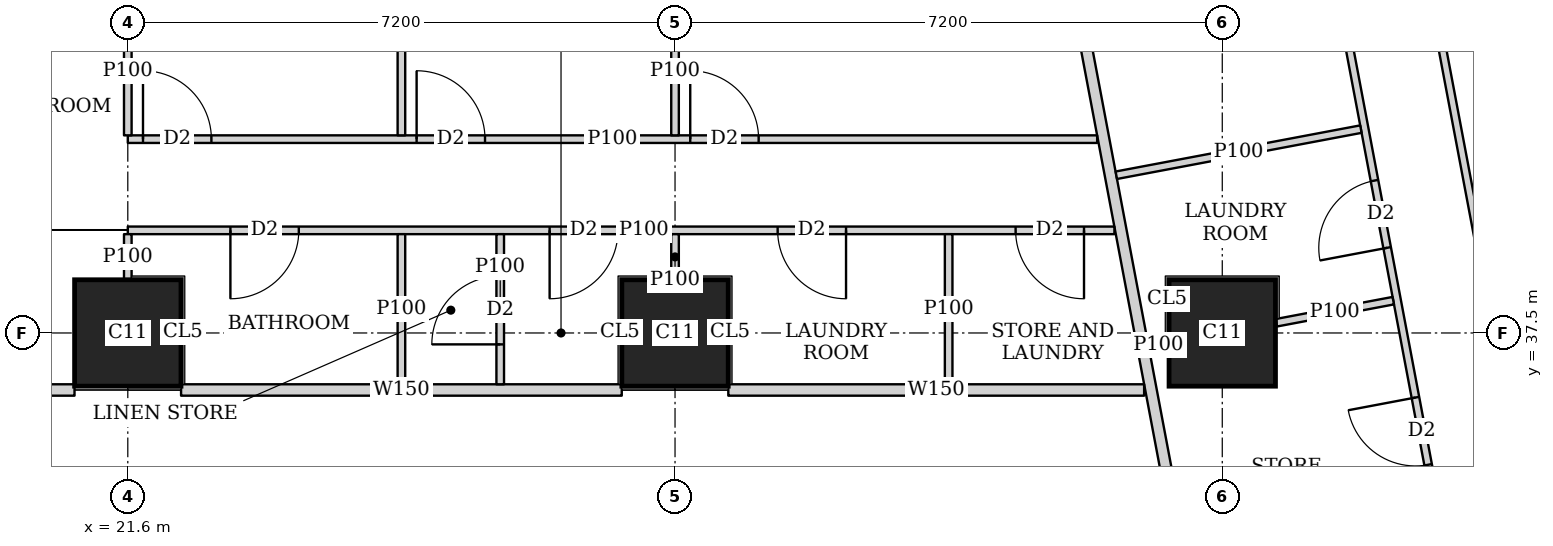
"""IFC4 building model, lengths in metres.
Left out: names, types, materials, properties, quantities, classifications, styles, units other than length and angle.
Written with IfcOpenShell. Run it as: python <this file> out.ifc"""

import sys

from ifc_helpers import new_model, si_unit, direction, frame, frame_2d, origin, origin_2d, place, context, subcontext, project, spatial, rectangle, extrude, element, fill, save


model = new_model("IFC4")
c1 = context("Model", 3, precision=1e-05, world=origin(), true_north=direction((0.0, 1.0)))
c2 = subcontext(c1, "Body", "Model", "MODEL_VIEW")
j1 = project(units=[si_unit("LENGTHUNIT", "METRE"), si_unit("PLANEANGLEUNIT", "RADIAN")], contexts=[c1])
p1 = place(None, origin())
s1 = spatial("IfcSite", under=j1, at=p1, CompositionType="ELEMENT")
p2 = place(p1, origin())
s2 = spatial("IfcBuilding", under=s1, at=p2, CompositionType="ELEMENT")
p3 = place(p2, frame((0.0, 0.0, 270.35)))
s3 = spatial("IfcBuildingStorey", under=s2, at=p3, CompositionType="ELEMENT", Elevation=270.35)
for number, where, z_axis, x_axis in (
    (1, (21.6, 37.5, 0.0), (0.0, 0.0, 1.0), (1.0, 0.0, 0.0)),
    (2, (28.8, 37.5, 0.0), (0.0, 0.0, 1.0), (1.0, 0.0, 0.0)),
    (3, (36.0, 37.5, 0.0), (0.0, 0.0, 1.0), (1.0, 0.0, 0.0)),
):
    element("IfcColumn", number, at=place(p3, frame(where, z_axis=z_axis, x_axis=x_axis)), inside=s3, PredefinedType="COLUMN", context=c2, shape_type="SweptSolid", body=[
        extrude(rectangle(XDim=1.4, YDim=1.4, at=origin_2d()), origin(), (0.0, 0.0, 1.0), 3.75),
    ])
p4 = place(p3, frame((16.001, 36.75, 0.0), z_axis=(0.0, 0.0, 1.0), x_axis=(1.0, 0.0, 0.0)))
e4 = element("IfcWall", 4, at=p4, inside=s3, PredefinedType="SOLIDWALL", context=c2, shape_type="SweptSolid", body=[
    extrude(rectangle(XDim=4.898, YDim=0.15, at=frame_2d((2.449, 0.0))), origin(), (0.0, 0.0, 1.0), 3.5),
])
p5 = place(p4, frame((1.074, 0.0, 0.0)))
e5 = element("IfcOpeningElement", 5, at=p5, cuts=e4, PredefinedType="OPENING", context=c2, shape_type="SweptSolid", body=[
    extrude(rectangle(XDim=1.0, YDim=2.1, at=frame_2d((0.5, 1.05))), frame((0.0, 0.085, 0.0), z_axis=(0.0, -1.0, 0.0), x_axis=(1.0, 0.0, 0.0)), (0.0, 0.0, 1.0), 0.17),
])
p6 = place(p3, frame((22.301, 36.75, 0.0), z_axis=(0.0, 0.0, 1.0), x_axis=(1.0, 0.0, 0.0)))
e6 = element("IfcWall", 6, at=p6, inside=s3, PredefinedType="SOLIDWALL", context=c2, shape_type="SweptSolid", body=[
    extrude(rectangle(XDim=5.798, YDim=0.15, at=frame_2d((2.899, 0.0))), origin(), (0.0, 0.0, 1.0), 3.5),
])
p7 = place(p3, frame((29.501, 36.75, 0.0), z_axis=(0.0, 0.0, 1.0), x_axis=(1.0, 0.0, 0.0)))
e7 = element("IfcWall", 7, at=p7, inside=s3, PredefinedType="SOLIDWALL", context=c2, shape_type="SweptSolid", body=[
    extrude(rectangle(XDim=5.471, YDim=0.15, at=frame_2d((2.735, 0.0))), origin(), (0.0, 0.0, 1.0), 3.5),
])
p8 = place(p3, frame((34.036, 42.186, 0.0), z_axis=(0.0, 0.0, 1.0), x_axis=(0.185593518645, -0.9826266055, 0.0)))
e8 = element("IfcWall", 8, at=p8, inside=s3, PredefinedType="SOLIDWALL", context=c2, shape_type="SweptSolid", body=[
    extrude(rectangle(XDim=35.961, YDim=0.15, at=frame_2d((17.98, 0.0))), origin(), (0.0, 0.0, 1.0), 2.5),
])
p9 = place(p8, frame((15.529, 0.0, 0.0)))
e9 = element("IfcOpeningElement", 9, at=p9, cuts=e8, PredefinedType="OPENING", context=c2, shape_type="SweptSolid", body=[
    extrude(rectangle(XDim=1.0, YDim=2.1, at=frame_2d((0.5, 1.05))), frame((0.0, 0.085, 0.0), z_axis=(0.0, -1.0, 0.0), x_axis=(1.0, 0.0, 0.0)), (0.0, 0.0, 1.0), 0.17),
])
p10 = place(p8, frame((19.345, 0.0, 0.0)))
e10 = element("IfcOpeningElement", 10, at=p10, cuts=e8, PredefinedType="OPENING", context=c2, shape_type="SweptSolid", body=[
    extrude(rectangle(XDim=1.0, YDim=2.1, at=frame_2d((0.5, 1.05))), frame((0.0, 0.085, 0.0), z_axis=(0.0, -1.0, 0.0), x_axis=(1.0, 0.0, 0.0)), (0.0, 0.0, 1.0), 0.17),
])
p11 = place(p8, frame((30.594, 0.0, 0.0)))
e11 = element("IfcOpeningElement", 11, at=p11, cuts=e8, PredefinedType="OPENING", context=c2, shape_type="SweptSolid", body=[
    extrude(rectangle(XDim=1.0, YDim=2.1, at=frame_2d((0.5, 1.05))), frame((0.0, 0.085, 0.0), z_axis=(0.0, -1.0, 0.0), x_axis=(1.0, 0.0, 0.0)), (0.0, 0.0, 1.0), 0.17),
])
p12 = place(p3, frame((38.744, 42.045, 0.0), z_axis=(0.0, 0.0, 1.0), x_axis=(0.185614085367, -0.982622720739, 0.0)))
e12 = element("IfcWall", 12, at=p12, inside=s3, PredefinedType="PARTITIONING", context=c2, shape_type="SweptSolid", body=[
    extrude(rectangle(XDim=12.898, YDim=0.1, at=frame_2d((6.449, 0.0))), origin(), (0.0, 0.0, 1.0), 2.5),
])
p13 = place(p12, frame((11.848, 0.0, 0.0)))
e13 = element("IfcOpeningElement", 13, at=p13, cuts=e12, PredefinedType="OPENING", context=c2, shape_type="SweptSolid", body=[
    extrude(rectangle(XDim=0.9, YDim=2.1, at=frame_2d((0.45, 1.05))), frame((0.0, 0.06, 0.0), z_axis=(0.0, -1.0, 0.0), x_axis=(1.0, 0.0, 0.0)), (0.0, 0.0, 1.0), 0.12),
])
p14 = place(p12, frame((8.191, 0.0, 0.0)))
e14 = element("IfcOpeningElement", 14, at=p14, cuts=e12, PredefinedType="OPENING", context=c2, shape_type="SweptSolid", body=[
    extrude(rectangle(XDim=0.9, YDim=2.1, at=frame_2d((0.45, 1.05))), frame((0.0, 0.06, 0.0), z_axis=(0.0, -1.0, 0.0), x_axis=(1.0, 0.0, 0.0)), (0.0, 0.0, 1.0), 0.12),
])
p15 = place(p12, frame((4.215, 0.0, 0.0)))
e15 = element("IfcOpeningElement", 15, at=p15, cuts=e12, PredefinedType="OPENING", context=c2, shape_type="SweptSolid", body=[
    extrude(rectangle(XDim=0.9, YDim=2.1, at=frame_2d((0.45, 1.05))), frame((0.0, 0.06, 0.0), z_axis=(0.0, -1.0, 0.0), x_axis=(1.0, 0.0, 0.0)), (0.0, 0.0, 1.0), 0.12),
])
p16 = place(p3, frame((37.511, 42.109, 0.0), z_axis=(0.0, 0.0, 1.0), x_axis=(0.185550464988, -0.982634736279, 0.0)))
e16 = element("IfcWall", 16, at=p16, inside=s3, PredefinedType="PARTITIONING", context=c2, shape_type="SweptSolid", body=[
    extrude(rectangle(XDim=13.35, YDim=0.1, at=frame_2d((6.675, 0.0))), origin(), (0.0, 0.0, 1.0), 2.5),
])
p17 = place(p16, frame((11.845, 0.0, 0.0)))
e17 = element("IfcOpeningElement", 17, at=p17, cuts=e16, PredefinedType="OPENING", context=c2, shape_type="SweptSolid", body=[
    extrude(rectangle(XDim=0.9, YDim=2.1, at=frame_2d((0.45, 1.05))), frame((0.0, 0.06, 0.0), z_axis=(0.0, -1.0, 0.0), x_axis=(1.0, 0.0, 0.0)), (0.0, 0.0, 1.0), 0.12),
])
p18 = place(p16, frame((8.224, 0.0, 0.0)))
e18 = element("IfcOpeningElement", 18, at=p18, cuts=e16, PredefinedType="OPENING", context=c2, shape_type="SweptSolid", body=[
    extrude(rectangle(XDim=0.9, YDim=2.1, at=frame_2d((0.45, 1.05))), frame((0.0, 0.06, 0.0), z_axis=(0.0, -1.0, 0.0), x_axis=(1.0, 0.0, 0.0)), (0.0, 0.0, 1.0), 0.12),
])
p19 = place(p16, frame((2.65, 0.0, 0.0)))
e19 = element("IfcOpeningElement", 19, at=p19, cuts=e16, PredefinedType="OPENING", context=c2, shape_type="SweptSolid", body=[
    extrude(rectangle(XDim=0.9, YDim=2.1, at=frame_2d((0.45, 1.05))), frame((0.0, 0.06, 0.0), z_axis=(0.0, -1.0, 0.0), x_axis=(1.0, 0.0, 0.0)), (0.0, 0.0, 1.0), 0.12),
])
p20 = place(p16, frame((9.936, 0.0, 0.0)))
e20 = element("IfcOpeningElement", 20, at=p20, cuts=e16, PredefinedType="OPENING", context=c2, shape_type="SweptSolid", body=[
    extrude(rectangle(XDim=0.9, YDim=2.1, at=frame_2d((0.45, 1.05))), frame((0.0, 0.06, 0.0), z_axis=(0.0, -1.0, 0.0), x_axis=(1.0, 0.0, 0.0)), (0.0, 0.0, 1.0), 0.12),
])
p21 = place(p16, frame((5.555, 0.0, 0.0)))
e21 = element("IfcOpeningElement", 21, at=p21, cuts=e16, PredefinedType="OPENING", context=c2, shape_type="SweptSolid", body=[
    extrude(rectangle(XDim=0.9, YDim=2.1, at=frame_2d((0.45, 1.05))), frame((0.0, 0.06, 0.0), z_axis=(0.0, -1.0, 0.0), x_axis=(1.0, 0.0, 0.0)), (0.0, 0.0, 1.0), 0.12),
])
p22 = place(p3, frame((37.824, 40.182, 0.0), z_axis=(0.0, 0.0, 1.0), x_axis=(-0.982674977865, -0.185337227447, 0.0)))
e22 = element("IfcWall", 22, at=p22, inside=s3, PredefinedType="PARTITIONING", context=c2, shape_type="SweptSolid", body=[
    extrude(rectangle(XDim=3.275, YDim=0.1, at=frame_2d((1.637, 0.0))), origin(), (0.0, 0.0, 1.0), 3.5),
])
p23 = place(p3, frame((38.25, 37.925, 0.0), z_axis=(0.0, 0.0, 1.0), x_axis=(-0.982610209589, -0.185680305934, 0.0)))
e23 = element("IfcWall", 23, at=p23, inside=s3, PredefinedType="PARTITIONING", context=c2, shape_type="SweptSolid", body=[
    extrude(rectangle(XDim=1.567, YDim=0.1, at=frame_2d((0.784, 0.0))), origin(), (0.0, 0.0, 1.0), 3.5),
])
p24 = place(p3, frame((35.29, 37.366, 0.0), z_axis=(0.0, 0.0, 1.0), x_axis=(-0.982395465615, -0.18681313963, 0.0)))
e24 = element("IfcWall", 24, at=p24, inside=s3, PredefinedType="PARTITIONING", context=c2, shape_type="SweptSolid", body=[
    extrude(rectangle(XDim=0.263, YDim=0.1, at=frame_2d((0.131, 0.0))), origin(), (0.0, 0.0, 1.0), 3.5),
])
p25 = place(p3, frame((21.6, 40.05, 0.0), z_axis=(0.0, 0.0, 1.0), x_axis=(1.0, 0.0, 0.0)))
e25 = element("IfcWall", 25, at=p25, inside=s3, PredefinedType="PARTITIONING", context=c2, shape_type="SweptSolid", body=[
    extrude(rectangle(XDim=12.754, YDim=0.1, at=frame_2d((6.377, 0.0))), origin(), (0.0, 0.0, 1.0), 3.5),
])
p26 = place(p25, frame((0.2, 0.0, 0.0)))
e26 = element("IfcOpeningElement", 26, at=p26, cuts=e25, PredefinedType="OPENING", context=c2, shape_type="SweptSolid", body=[
    extrude(rectangle(XDim=0.9, YDim=2.1, at=frame_2d((0.45, 1.05))), frame((0.0, 0.06, 0.0), z_axis=(0.0, -1.0, 0.0), x_axis=(1.0, 0.0, 0.0)), (0.0, 0.0, 1.0), 0.12),
])
p27 = place(p25, frame((3.8, 0.0, 0.0)))
e27 = element("IfcOpeningElement", 27, at=p27, cuts=e25, PredefinedType="OPENING", context=c2, shape_type="SweptSolid", body=[
    extrude(rectangle(XDim=0.9, YDim=2.1, at=frame_2d((0.45, 1.05))), frame((0.0, 0.06, 0.0), z_axis=(0.0, -1.0, 0.0), x_axis=(1.0, 0.0, 0.0)), (0.0, 0.0, 1.0), 0.12),
])
p28 = place(p25, frame((7.4, 0.0, 0.0)))
e28 = element("IfcOpeningElement", 28, at=p28, cuts=e25, PredefinedType="OPENING", context=c2, shape_type="SweptSolid", body=[
    extrude(rectangle(XDim=0.9, YDim=2.1, at=frame_2d((0.45, 1.05))), frame((0.0, 0.06, 0.0), z_axis=(0.0, -1.0, 0.0), x_axis=(1.0, 0.0, 0.0)), (0.0, 0.0, 1.0), 0.12),
])
p29 = place(p3, frame((21.6, 38.85, 0.0), z_axis=(0.0, 0.0, 1.0), x_axis=(1.0, 0.0, 0.0)))
e29 = element("IfcWall", 29, at=p29, inside=s3, PredefinedType="PARTITIONING", context=c2, shape_type="SweptSolid", body=[
    extrude(rectangle(XDim=12.981, YDim=0.1, at=frame_2d((6.49, 0.0))), origin(), (0.0, 0.0, 1.0), 3.5),
])
p30 = place(p29, frame((1.35, 0.0, 0.0)))
e30 = element("IfcOpeningElement", 30, at=p30, cuts=e29, PredefinedType="OPENING", context=c2, shape_type="SweptSolid", body=[
    extrude(rectangle(XDim=0.9, YDim=2.1, at=frame_2d((0.45, 1.05))), frame((0.0, 0.06, 0.0), z_axis=(0.0, -1.0, 0.0), x_axis=(1.0, 0.0, 0.0)), (0.0, 0.0, 1.0), 0.12),
])
p31 = place(p29, frame((5.55, 0.0, 0.0)))
e31 = element("IfcOpeningElement", 31, at=p31, cuts=e29, PredefinedType="OPENING", context=c2, shape_type="SweptSolid", body=[
    extrude(rectangle(XDim=0.9, YDim=2.1, at=frame_2d((0.45, 1.05))), frame((0.0, 0.06, 0.0), z_axis=(0.0, -1.0, 0.0), x_axis=(1.0, 0.0, 0.0)), (0.0, 0.0, 1.0), 0.12),
])
p32 = place(p29, frame((8.55, 0.0, 0.0)))
e32 = element("IfcOpeningElement", 32, at=p32, cuts=e29, PredefinedType="OPENING", context=c2, shape_type="SweptSolid", body=[
    extrude(rectangle(XDim=0.9, YDim=2.1, at=frame_2d((0.45, 1.05))), frame((0.0, 0.06, 0.0), z_axis=(0.0, -1.0, 0.0), x_axis=(1.0, 0.0, 0.0)), (0.0, 0.0, 1.0), 0.12),
])
p33 = place(p29, frame((11.681, 0.0, 0.0)))
e33 = element("IfcOpeningElement", 33, at=p33, cuts=e29, PredefinedType="OPENING", context=c2, shape_type="SweptSolid", body=[
    extrude(rectangle(XDim=0.9, YDim=2.1, at=frame_2d((0.45, 1.05))), frame((0.0, 0.06, 0.0), z_axis=(0.0, -1.0, 0.0), x_axis=(1.0, 0.0, 0.0)), (0.0, 0.0, 1.0), 0.12),
])
p34 = place(p3, frame((21.6, 40.1, 0.0), z_axis=(0.0, 0.0, 1.0), x_axis=(0.0, 1.0, 0.0)))
e34 = element("IfcWall", 34, at=p34, inside=s3, PredefinedType="PARTITIONING", context=c2, shape_type="SweptSolid", body=[
    extrude(rectangle(XDim=1.699, YDim=0.1, at=frame_2d((0.85, 0.0))), origin(), (0.0, 0.0, 1.0), 3.5),
])
p35 = place(p3, frame((25.2, 40.1, 0.0), z_axis=(0.0, 0.0, 1.0), x_axis=(0.0, 1.0, 0.0)))
e35 = element("IfcWall", 35, at=p35, inside=s3, PredefinedType="PARTITIONING", context=c2, shape_type="SweptSolid", body=[
    extrude(rectangle(XDim=3.75, YDim=0.1, at=frame_2d((1.875, 0.0))), origin(), (0.0, 0.0, 1.0), 2.05),
])
p36 = place(p3, frame((28.8, 40.1, 0.0), z_axis=(0.0, 0.0, 1.0), x_axis=(0.0, 1.0, 0.0)))
e36 = element("IfcWall", 36, at=p36, inside=s3, PredefinedType="PARTITIONING", context=c2, shape_type="SweptSolid", body=[
    extrude(rectangle(XDim=1.699, YDim=0.1, at=frame_2d((0.85, 0.0))), origin(), (0.0, 0.0, 1.0), 3.5),
])
p37 = place(p3, frame((21.6, 38.201, 0.0), z_axis=(0.0, 0.0, 1.0), x_axis=(0.0, 1.0, 0.0)))
e37 = element("IfcWall", 37, at=p37, inside=s3, PredefinedType="PARTITIONING", context=c2, shape_type="SweptSolid", body=[
    extrude(rectangle(XDim=0.599, YDim=0.1, at=frame_2d((0.3, 0.0))), origin(), (0.0, 0.0, 1.0), 3.5),
])
p38 = place(p3, frame((25.2, 36.825, 0.0), z_axis=(0.0, 0.0, 1.0), x_axis=(0.0, 1.0, 0.0)))
e38 = element("IfcWall", 38, at=p38, inside=s3, PredefinedType="PARTITIONING", context=c2, shape_type="SweptSolid", body=[
    extrude(rectangle(XDim=1.975, YDim=0.1, at=frame_2d((0.988, 0.0))), origin(), (0.0, 0.0, 1.0), 3.5),
])
p39 = place(p3, frame((28.8, 38.201, 0.0), z_axis=(0.0, 0.0, 1.0), x_axis=(0.0, 1.0, 0.0)))
e39 = element("IfcWall", 39, at=p39, inside=s3, PredefinedType="PARTITIONING", context=c2, shape_type="SweptSolid", body=[
    extrude(rectangle(XDim=0.599, YDim=0.1, at=frame_2d((0.3, 0.0))), origin(), (0.0, 0.0, 1.0), 3.5),
])
p40 = place(p3, frame((32.4, 36.825, 0.0), z_axis=(0.0, 0.0, 1.0), x_axis=(0.0, 1.0, 0.0)))
e40 = element("IfcWall", 40, at=p40, inside=s3, PredefinedType="PARTITIONING", context=c2, shape_type="SweptSolid", body=[
    extrude(rectangle(XDim=1.975, YDim=0.1, at=frame_2d((0.988, 0.0))), origin(), (0.0, 0.0, 1.0), 3.5),
])
p41 = place(p3, frame((26.5, 36.825, 0.0), z_axis=(0.0, 0.0, 1.0), x_axis=(0.0, 1.0, 0.0)))
e41 = element("IfcWall", 41, at=p41, inside=s3, PredefinedType="PARTITIONING", context=c2, shape_type="SweptSolid", body=[
    extrude(rectangle(XDim=1.975, YDim=0.1, at=frame_2d((0.988, 0.0))), origin(), (0.0, 0.0, 1.0), 3.5),
])
p42 = place(p41, frame((0.525, 0.0, 0.0)))
e42 = element("IfcOpeningElement", 42, at=p42, cuts=e41, PredefinedType="OPENING", context=c2, shape_type="SweptSolid", body=[
    extrude(rectangle(XDim=0.9, YDim=2.1, at=frame_2d((0.45, 1.05))), frame((0.0, 0.06, 0.0), z_axis=(0.0, -1.0, 0.0), x_axis=(1.0, 0.0, 0.0)), (0.0, 0.0, 1.0), 0.12),
])
p43 = place(p19, origin())
e43 = element("IfcDoor", 43, at=p43, inside=s3, OperationType="SINGLE_SWING_LEFT", PredefinedType="DOOR", context=c2, shape_type="SweptSolid", body=[
    extrude(rectangle(XDim=0.9, YDim=2.1, at=frame_2d((0.45, 1.05))), frame((0.0, 0.025, 0.0), z_axis=(0.0, -1.0, 0.0), x_axis=(1.0, 0.0, 0.0)), (0.0, 0.0, 1.0), 0.05),
])
fill(e19, e43)
p44 = place(p21, origin())
e44 = element("IfcDoor", 44, at=p44, inside=s3, OperationType="SINGLE_SWING_RIGHT", PredefinedType="DOOR", context=c2, shape_type="SweptSolid", body=[
    extrude(rectangle(XDim=0.9, YDim=2.1, at=frame_2d((0.45, 1.05))), frame((0.0, 0.025, 0.0), z_axis=(0.0, -1.0, 0.0), x_axis=(1.0, 0.0, 0.0)), (0.0, 0.0, 1.0), 0.05),
])
fill(e21, e44)
p45 = place(p26, origin())
e45 = element("IfcDoor", 45, at=p45, inside=s3, OperationType="SINGLE_SWING_LEFT", PredefinedType="DOOR", context=c2, shape_type="SweptSolid", body=[
    extrude(rectangle(XDim=0.9, YDim=2.1, at=frame_2d((0.45, 1.05))), frame((0.0, 0.025, 0.0), z_axis=(0.0, -1.0, 0.0), x_axis=(1.0, 0.0, 0.0)), (0.0, 0.0, 1.0), 0.05),
])
fill(e26, e45)
p46 = place(p27, origin())
e46 = element("IfcDoor", 46, at=p46, inside=s3, OperationType="SINGLE_SWING_LEFT", PredefinedType="DOOR", context=c2, shape_type="SweptSolid", body=[
    extrude(rectangle(XDim=0.9, YDim=2.1, at=frame_2d((0.45, 1.05))), frame((0.0, 0.025, 0.0), z_axis=(0.0, -1.0, 0.0), x_axis=(1.0, 0.0, 0.0)), (0.0, 0.0, 1.0), 0.05),
])
fill(e27, e46)
p47 = place(p28, origin())
e47 = element("IfcDoor", 47, at=p47, inside=s3, OperationType="SINGLE_SWING_LEFT", PredefinedType="DOOR", context=c2, shape_type="SweptSolid", body=[
    extrude(rectangle(XDim=0.9, YDim=2.1, at=frame_2d((0.45, 1.05))), frame((0.0, 0.025, 0.0), z_axis=(0.0, -1.0, 0.0), x_axis=(1.0, 0.0, 0.0)), (0.0, 0.0, 1.0), 0.05),
])
fill(e28, e47)
p48 = place(p30, origin())
e48 = element("IfcDoor", 48, at=p48, inside=s3, OperationType="SINGLE_SWING_RIGHT", PredefinedType="DOOR", context=c2, shape_type="SweptSolid", body=[
    extrude(rectangle(XDim=0.9, YDim=2.1, at=frame_2d((0.45, 1.05))), frame((0.0, 0.025, 0.0), z_axis=(0.0, -1.0, 0.0), x_axis=(1.0, 0.0, 0.0)), (0.0, 0.0, 1.0), 0.05),
])
fill(e30, e48)
p49 = place(p31, origin())
e49 = element("IfcDoor", 49, at=p49, inside=s3, OperationType="SINGLE_SWING_RIGHT", PredefinedType="DOOR", context=c2, shape_type="SweptSolid", body=[
    extrude(rectangle(XDim=0.9, YDim=2.1, at=frame_2d((0.45, 1.05))), frame((0.0, 0.025, 0.0), z_axis=(0.0, -1.0, 0.0), x_axis=(1.0, 0.0, 0.0)), (0.0, 0.0, 1.0), 0.05),
])
fill(e31, e49)
p50 = place(p32, origin())
e50 = element("IfcDoor", 50, at=p50, inside=s3, OperationType="SINGLE_SWING_LEFT", PredefinedType="DOOR", context=c2, shape_type="SweptSolid", body=[
    extrude(rectangle(XDim=0.9, YDim=2.1, at=frame_2d((0.45, 1.05))), frame((0.0, 0.025, 0.0), z_axis=(0.0, -1.0, 0.0), x_axis=(1.0, 0.0, 0.0)), (0.0, 0.0, 1.0), 0.05),
])
fill(e32, e50)
p51 = place(p33, origin())
e51 = element("IfcDoor", 51, at=p51, inside=s3, OperationType="SINGLE_SWING_LEFT", PredefinedType="DOOR", context=c2, shape_type="SweptSolid", body=[
    extrude(rectangle(XDim=0.9, YDim=2.1, at=frame_2d((0.45, 1.05))), frame((0.0, 0.025, 0.0), z_axis=(0.0, -1.0, 0.0), x_axis=(1.0, 0.0, 0.0)), (0.0, 0.0, 1.0), 0.05),
])
fill(e33, e51)
p52 = place(p42, origin())
e52 = element("IfcDoor", 52, at=p52, inside=s3, OperationType="SINGLE_SWING_LEFT", PredefinedType="DOOR", context=c2, shape_type="SweptSolid", body=[
    extrude(rectangle(XDim=0.9, YDim=2.1, at=frame_2d((0.45, 1.05))), frame((0.0, 0.025, 0.0), z_axis=(0.0, -1.0, 0.0), x_axis=(1.0, 0.0, 0.0)), (0.0, 0.0, 1.0), 0.05),
])
fill(e42, e52)
save(model, sys.argv[1])
